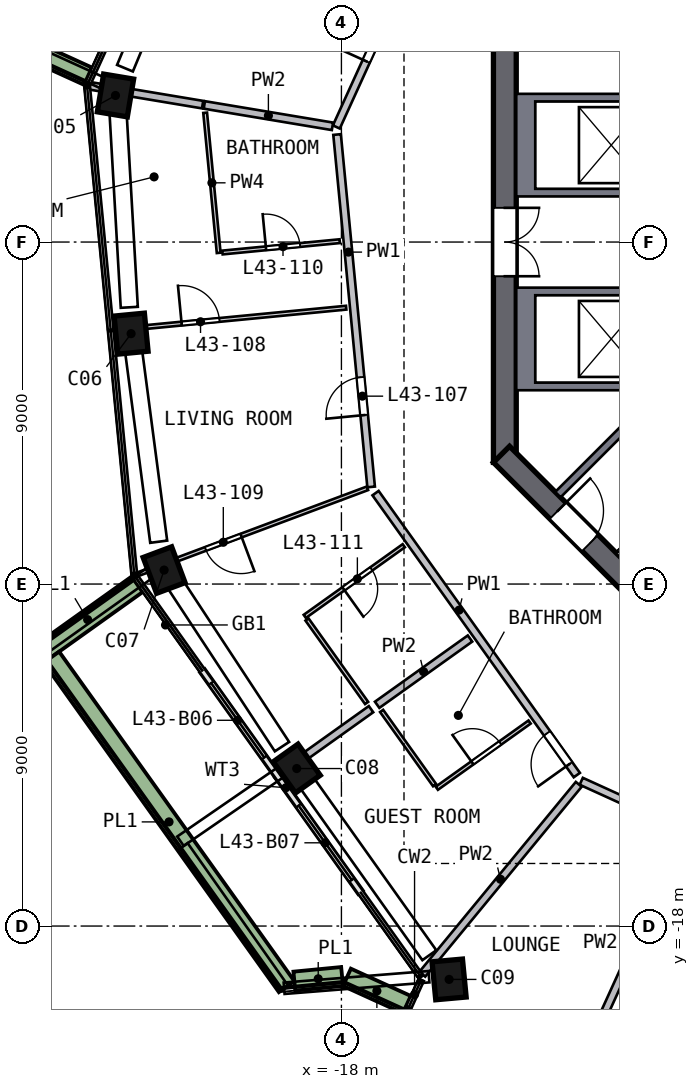
"""IFC4 building model, lengths in metres.
Left out: names, types, materials, properties, quantities, classifications, styles, units other than length and angle.
Written with IfcOpenShell. Run it as: python <this file> out.ifc"""

import sys

from ifc_helpers import new_model, si_unit, direction, frame, frame_2d, origin, origin_2d, place, context, subcontext, project, spatial, polyline, rectangle, outline, extrude, element, fill, save


model = new_model("IFC4")
c1 = context("Model", 3, precision=1e-05, world=origin(), true_north=direction((0.0, 1.0)))
c2 = subcontext(c1, "Body", "Model", "MODEL_VIEW")
j1 = project(units=[si_unit("LENGTHUNIT", "METRE"), si_unit("PLANEANGLEUNIT", "RADIAN")], contexts=[c1])
p1 = place(None, origin())
s1 = spatial("IfcSite", under=j1, at=p1, CompositionType="ELEMENT")
p2 = place(p1, origin())
s2 = spatial("IfcBuilding", under=s1, at=p2, CompositionType="ELEMENT")
p3 = place(p2, frame((0.0, 0.0, 180.0)))
s3 = spatial("IfcBuildingStorey", under=s2, at=p3, CompositionType="ELEMENT", Elevation=180.0)
p4 = place(p3, frame((-23.924, 3.995, 0.0), z_axis=(-0.018017551, -0.113959111, 0.993322047), x_axis=(0.163447069, 0.979782982, 0.115370553)))
e1 = element("IfcColumn", 1, at=p4, inside=s3, PredefinedType="COLUMN", context=c2, shape_type="SweptSolid", body=[
    extrude(rectangle(XDim=1.0, YDim=0.8, at=origin_2d()), origin(), (0.0, 0.0, 1.0), 3.211),
])
p5 = place(p3, frame((-23.549, -2.276, 0.0), z_axis=(0.011711521, -0.111867836, 0.993654078), x_axis=(0.095071466, -0.989095922, -0.112475211)))
e2 = element("IfcColumn", 2, at=p5, inside=s3, PredefinedType="COLUMN", context=c2, shape_type="SweptSolid", body=[
    extrude(rectangle(XDim=1.0, YDim=0.8, at=origin_2d()), origin(), (0.0, 0.0, 1.0), 3.21),
])
p6 = place(p3, frame((-22.716, -8.502, 0.0), z_axis=(0.041357002, -0.107649845, 0.993328299), x_axis=(-0.348347978, 0.93024499, 0.115316716)))
e3 = element("IfcColumn", 3, at=p6, inside=s3, PredefinedType="COLUMN", context=c2, shape_type="SweptSolid", body=[
    extrude(rectangle(XDim=1.0, YDim=0.8, at=origin_2d()), origin(), (0.0, 0.0, 1.0), 3.211),
])
p7 = place(p3, frame((-19.256, -13.745, 0.0), z_axis=(0.066161617, -0.091105306, 0.993641013), x_axis=(0.577029592, -0.808925346, -0.112590564)))
e4 = element("IfcColumn", 4, at=p7, inside=s3, PredefinedType="COLUMN", context=c2, shape_type="SweptSolid", body=[
    extrude(rectangle(XDim=1.0, YDim=0.8, at=origin_2d()), origin(), (0.0, 0.0, 1.0), 3.21),
])
p8 = place(p3, frame((-15.278, -19.318, 0.0), z_axis=(0.092426186, -0.071827916, 0.993125446), x_axis=(-0.089190474, 0.992788189, 0.080104122)))
e5 = element("IfcColumn", 5, at=p8, inside=s3, PredefinedType="COLUMN", context=c2, shape_type="SweptSolid", body=[
    extrude(rectangle(XDim=1.0, YDim=0.8, at=origin_2d()), origin(), (0.0, 0.0, 1.0), 3.212),
])
p9 = place(p3, frame((-13.7, 5.799, 0.0), z_axis=(0.0, 0.0, 1.0), x_axis=(0.0, -1.0, 0.0)))
e6 = element("IfcWall", 6, at=p9, inside=s3, PredefinedType="SHEAR", context=c2, shape_type="SweptSolid", body=[
    extrude(rectangle(XDim=11.598, YDim=0.6, at=frame_2d((5.799, 0.0))), origin(), (0.0, 0.0, 1.0), 3.5),
])
p10 = place(p9, frame((4.899, 0.0, 0.0)))
e7 = element("IfcOpeningElement", 7, at=p10, cuts=e6, PredefinedType="OPENING", context=c2, shape_type="SweptSolid", body=[
    extrude(rectangle(XDim=1.8, YDim=2.1, at=frame_2d((0.9, 1.05))), frame((0.0, 0.31, 0.0), z_axis=(0.0, -1.0, 0.0), x_axis=(1.0, 0.0, 0.0)), (0.0, 0.0, 1.0), 0.62),
])
p11 = place(p3, frame((-13.788, -5.587, 0.0), z_axis=(0.0, 0.0, 1.0), x_axis=(0.707106781, -0.707106781, 0.0)))
e8 = element("IfcWall", 8, at=p11, inside=s3, PredefinedType="SHEAR", context=c2, shape_type="SweptSolid", body=[
    extrude(rectangle(XDim=11.598, YDim=0.6, at=frame_2d((5.799, 0.0))), origin(), (0.0, 0.0, 1.0), 3.5),
])
p12 = place(p11, frame((2.099, 0.0, 0.0)))
e9 = element("IfcOpeningElement", 9, at=p12, cuts=e8, PredefinedType="OPENING", context=c2, shape_type="SweptSolid", body=[
    extrude(rectangle(XDim=1.2, YDim=2.1, at=frame_2d((0.6, 1.05))), frame((0.0, 0.31, 0.0), z_axis=(0.0, -1.0, 0.0), x_axis=(1.0, 0.0, 0.0)), (0.0, 0.0, 1.0), 0.62),
])
p13 = place(p3, frame((-16.351, -20.226, 0.0), z_axis=(0.0, 0.0, 1.0), x_axis=(0.910134462, -0.414312998, 0.0)))
e10 = element("IfcWall", 10, at=p13, inside=s3, PredefinedType="SOLIDWALL", context=c2, shape_type="SweptSolid", body=[
    extrude(rectangle(XDim=1.875, YDim=0.15, at=frame_2d((0.938, 0.0))), origin(), (0.0, 0.0, 1.0), 3.19),
])
p14 = place(p3, frame((-21.658, -11.283, 0.0), z_axis=(0.0, 0.0, 1.0), x_axis=(0.580980052, -0.813917796, 0.0)))
e11 = element("IfcWall", 11, at=p14, inside=s3, PredefinedType="SOLIDWALL", context=c2, shape_type="SweptSolid", body=[
    extrude(rectangle(XDim=3.4, YDim=0.15, at=frame_2d((1.7, 0.0))), origin(), (0.0, 0.0, 1.0), 2.475),
])
p15 = place(p14, frame((0.4, 0.0, 0.0)))
e12 = element("IfcOpeningElement", 12, at=p15, cuts=e11, PredefinedType="OPENING", context=c2, shape_type="SweptSolid", body=[
    extrude(rectangle(XDim=2.4, YDim=2.4, at=frame_2d((1.2, 1.2))), frame((0.0, 0.085, 0.0), z_axis=(0.0, -1.0, 0.0), x_axis=(1.0, 0.0, 0.0)), (0.0, 0.0, 1.0), 0.17),
])
p16 = place(p3, frame((-19.683, -14.05, 0.0), z_axis=(0.0, 0.0, 1.0), x_axis=(0.581004847, -0.813900097, 0.0)))
e13 = element("IfcWall", 13, at=p16, inside=s3, PredefinedType="SOLIDWALL", context=c2, shape_type="SweptSolid", body=[
    extrude(rectangle(XDim=3.761, YDim=0.15, at=frame_2d((1.881, 0.0))), origin(), (0.0, 0.0, 1.0), 2.475),
])
p17 = place(p16, frame((0.961, 0.0, 0.0)))
e14 = element("IfcOpeningElement", 14, at=p17, cuts=e13, PredefinedType="OPENING", context=c2, shape_type="SweptSolid", body=[
    extrude(rectangle(XDim=2.4, YDim=2.4, at=frame_2d((1.2, 1.2))), frame((0.0, 0.085, 0.0), z_axis=(0.0, -1.0, 0.0), x_axis=(1.0, 0.0, 0.0)), (0.0, 0.0, 1.0), 0.17),
])
p18 = place(p3, frame((-27.125, 5.483, 0.0), z_axis=(0.0, 0.0, 1.0), x_axis=(0.910099871, -0.414388978, 0.0)))
e15 = element("IfcWall", 15, at=p18, inside=s3, PredefinedType="SOLIDWALL", context=c2, shape_type="SweptSolid", body=[
    extrude(rectangle(XDim=2.699, YDim=0.5, at=frame_2d((1.35, 0.0))), origin(), (0.0, 0.0, 1.0), 0.7),
])
p19 = place(p3, frame((-23.376, -9.007, 0.0), z_axis=(0.0, 0.0, 1.0), x_axis=(-0.813882991, -0.581028808, 0.0)))
e16 = element("IfcWall", 16, at=p19, inside=s3, PredefinedType="SOLIDWALL", context=c2, shape_type="SweptSolid", body=[
    extrude(rectangle(XDim=3.199, YDim=0.5, at=frame_2d((1.6, 0.0))), origin(), (0.0, 0.0, 1.0), 0.7),
])
p20 = place(p3, frame((-25.631, -10.924, 0.0), z_axis=(0.0, 0.0, 1.0), x_axis=(0.580988848, -0.813911517, 0.0)))
e17 = element("IfcWall", 17, at=p20, inside=s3, PredefinedType="SOLIDWALL", context=c2, shape_type="SweptSolid", body=[
    extrude(rectangle(XDim=10.653, YDim=0.5, at=frame_2d((5.326, 0.0))), origin(), (0.0, 0.0, 1.0), 0.7),
])
p21 = place(p3, frame((-19.239, -19.449, 0.0), z_axis=(0.0, 0.0, 1.0), x_axis=(0.995350014, 0.096324195, 0.0)))
e18 = element("IfcWall", 18, at=p21, inside=s3, PredefinedType="SOLIDWALL", context=c2, shape_type="SweptSolid", body=[
    extrude(rectangle(XDim=1.262, YDim=0.5, at=frame_2d((0.631, 0.0))), origin(), (0.0, 0.0, 1.0), 0.7),
])
p22 = place(p3, frame((-17.855, -19.349, 0.0), z_axis=(0.0, 0.0, 1.0), x_axis=(0.910110312, -0.414366046, 0.0)))
e19 = element("IfcWall", 19, at=p22, inside=s3, PredefinedType="SOLIDWALL", context=c2, shape_type="SweptSolid", body=[
    extrude(rectangle(XDim=1.731, YDim=0.5, at=frame_2d((0.865, 0.0))), origin(), (0.0, 0.0, 1.0), 0.7),
])
p23 = place(p3, origin())
e20 = element("IfcWall", 20, at=p23, inside=s3, PredefinedType="SOLIDWALL", context=c2, shape_type="SweptSolid", body=[
    extrude(outline(polyline([(-13.4, 3.9), (-9.9, 3.9), (-9.9, 3.7), (-12.9, 3.7), (-12.9, 1.4), (-9.9, 1.4), (-9.9, 1.2), (-13.4, 1.2), (-13.4, 3.9)])), origin(), (0.0, 0.0, 1.0), 3.19),
])
p24 = place(p3, origin())
e21 = element("IfcWall", 21, at=p24, inside=s3, PredefinedType="SOLIDWALL", context=c2, shape_type="SweptSolid", body=[
    extrude(outline(polyline([(-13.4, -3.9), (-13.4, -1.2), (-9.9, -1.2), (-9.9, -1.4), (-12.9, -1.4), (-12.9, -3.7), (-9.9, -3.7), (-9.9, -3.9), (-13.4, -3.9)])), origin(), (0.0, 0.0, 1.0), 3.19),
])
p25 = place(p3, frame((-9.334, -3.677, 0.0), z_axis=(0.0, 0.0, 1.0), x_axis=(-0.707135845, -0.707077716, 0.0)))
e22 = element("IfcWall", 22, at=p25, inside=s3, PredefinedType="SOLIDWALL", context=c2, shape_type="SweptSolid", body=[
    extrude(rectangle(XDim=4.2, YDim=0.2, at=frame_2d((2.1, 0.0))), origin(), (0.0, 0.0, 1.0), 3.19),
])
p26 = place(p3, frame((-17.218, -6.445, 0.0), z_axis=(0.0, 0.0, 1.0), x_axis=(-0.096195227, 0.995362486, 0.0)))
e23 = element("IfcWall", 23, at=p26, inside=s3, PredefinedType="SOLIDWALL", context=c2, shape_type="SweptSolid", body=[
    extrude(rectangle(XDim=9.317, YDim=0.2, at=frame_2d((4.658, 0.0))), origin(), (0.0, 0.0, 1.0), 3.19),
])
p27 = place(p26, frame((1.9, 0.0, 0.0)))
e24 = element("IfcOpeningElement", 24, at=p27, cuts=e23, PredefinedType="OPENING", context=c2, shape_type="SweptSolid", body=[
    extrude(rectangle(XDim=1.0, YDim=2.1, at=frame_2d((0.5, 1.05))), frame((0.0, 0.11, 0.0), z_axis=(0.0, -1.0, 0.0), x_axis=(1.0, 0.0, 0.0)), (0.0, 0.0, 1.0), 0.22),
])
p28 = place(p3, frame((-18.134, 3.028, 0.0), z_axis=(0.0, 0.0, 1.0), x_axis=(0.414381347, 0.910103345, 0.0)))
e25 = element("IfcWall", 25, at=p28, inside=s3, PredefinedType="SOLIDWALL", context=c2, shape_type="SweptSolid", body=[
    extrude(rectangle(XDim=9.317, YDim=0.2, at=frame_2d((4.658, 0.0))), origin(), (0.0, 0.0, 1.0), 3.19),
])
p29 = place(p28, frame((1.9, 0.0, 0.0)))
e26 = element("IfcOpeningElement", 26, at=p29, cuts=e25, PredefinedType="OPENING", context=c2, shape_type="SweptSolid", body=[
    extrude(rectangle(XDim=1.0, YDim=2.1, at=frame_2d((0.5, 1.05))), frame((0.0, 0.11, 0.0), z_axis=(0.0, -1.0, 0.0), x_axis=(1.0, 0.0, 0.0)), (0.0, 0.0, 1.0), 0.22),
])
p30 = place(p3, frame((-11.805, -14.027, 0.0), z_axis=(0.0, 0.0, 1.0), x_axis=(-0.580997508, 0.813905336, 0.0)))
e27 = element("IfcWall", 27, at=p30, inside=s3, PredefinedType="SOLIDWALL", context=c2, shape_type="SweptSolid", body=[
    extrude(rectangle(XDim=9.116, YDim=0.2, at=frame_2d((4.558, 0.0))), origin(), (0.0, 0.0, 1.0), 3.19),
])
p31 = place(p30, frame((0.35, 0.0, 0.0)))
e28 = element("IfcOpeningElement", 28, at=p31, cuts=e27, PredefinedType="OPENING", context=c2, shape_type="SweptSolid", body=[
    extrude(rectangle(XDim=1.0, YDim=2.1, at=frame_2d((0.5, 1.05))), frame((0.0, 0.11, 0.0), z_axis=(0.0, -1.0, 0.0), x_axis=(1.0, 0.0, 0.0)), (0.0, 0.0, 1.0), 0.22),
])
p32 = place(p3, frame((-3.028, -18.134, 0.0), z_axis=(0.0, 0.0, 1.0), x_axis=(-0.910100085, 0.414388507, 0.0)))
e29 = element("IfcWall", 29, at=p32, inside=s3, PredefinedType="SOLIDWALL", context=c2, shape_type="SweptSolid", body=[
    extrude(rectangle(XDim=9.517, YDim=0.2, at=frame_2d((4.758, 0.0))), origin(), (0.0, 0.0, 1.0), 3.19),
])
p33 = place(p32, frame((3.869, 0.0, 0.0)))
e30 = element("IfcOpeningElement", 30, at=p33, cuts=e29, PredefinedType="OPENING", context=c2, shape_type="SweptSolid", body=[
    extrude(rectangle(XDim=1.8, YDim=2.1, at=frame_2d((0.9, 1.05))), frame((0.0, 0.11, 0.0), z_axis=(0.0, -1.0, 0.0), x_axis=(1.0, 0.0, 0.0)), (0.0, 0.0, 1.0), 0.22),
])
p34 = place(p3, frame((-21.653, 3.616, 0.0), z_axis=(0.0, 0.0, 1.0), x_axis=(-0.986336894, 0.1647408, 0.0)))
e31 = element("IfcWall", 31, at=p34, inside=s3, PredefinedType="SOLIDWALL", context=c2, shape_type="SweptSolid", body=[
    extrude(rectangle(XDim=3.011, YDim=0.2, at=frame_2d((1.506, 0.0))), origin(), (0.0, 0.0, 1.0), 3.19),
])
p35 = place(p3, frame((-18.236, 3.045, 0.0), z_axis=(0.0, 0.0, 1.0), x_axis=(-0.986343689, 0.164700112, 0.0)))
e32 = element("IfcWall", 32, at=p35, inside=s3, PredefinedType="SOLIDWALL", context=c2, shape_type="SweptSolid", body=[
    extrude(rectangle(XDim=3.418, YDim=0.2, at=frame_2d((1.709, 0.0))), origin(), (0.0, 0.0, 1.0), 3.19),
])
p36 = place(p3, frame((-17.221, -12.293, 0.0), z_axis=(0.0, 0.0, 1.0), x_axis=(-0.813929138, -0.580964163, 0.0)))
e33 = element("IfcWall", 33, at=p36, inside=s3, PredefinedType="SOLIDWALL", context=c2, shape_type="SweptSolid", body=[
    extrude(rectangle(XDim=2.95, YDim=0.2, at=frame_2d((1.475, 0.0))), origin(), (0.0, 0.0, 1.0), 3.19),
])
p37 = place(p3, frame((-14.616, -10.434, 0.0), z_axis=(0.0, 0.0, 1.0), x_axis=(-0.813909274, -0.580991992, 0.0)))
e34 = element("IfcWall", 34, at=p37, inside=s3, PredefinedType="SOLIDWALL", context=c2, shape_type="SweptSolid", body=[
    extrude(rectangle(XDim=3.002, YDim=0.2, at=frame_2d((1.501, 0.0))), origin(), (0.0, 0.0, 1.0), 3.19),
])
p38 = place(p3, frame((-15.872, -19.268, 0.0), z_axis=(0.0, 0.0, 1.0), x_axis=(0.635816927, 0.771839902, 0.0)))
e35 = element("IfcWall", 35, at=p38, inside=s3, PredefinedType="SOLIDWALL", context=c2, shape_type="SweptSolid", body=[
    extrude(rectangle(XDim=6.476, YDim=0.2, at=frame_2d((3.238, 0.0))), origin(), (0.0, 0.0, 1.0), 3.19),
])
p39 = place(p3, frame((-13.421, -25.433, 0.0), z_axis=(0.0, 0.0, 1.0), x_axis=(0.414377782, 0.910104968, 0.0)))
e36 = element("IfcWall", 36, at=p39, inside=s3, PredefinedType="SOLIDWALL", context=c2, shape_type="SweptSolid", body=[
    extrude(rectangle(XDim=10.75, YDim=0.2, at=frame_2d((5.375, 0.0))), origin(), (0.0, 0.0, 1.0), 3.19),
])
p40 = place(p39, frame((1.95, 0.0, 0.0)))
e37 = element("IfcOpeningElement", 37, at=p40, cuts=e36, PredefinedType="OPENING", context=c2, shape_type="SweptSolid", body=[
    extrude(rectangle(XDim=1.0, YDim=2.1, at=frame_2d((0.5, 1.05))), frame((0.0, 0.11, 0.0), z_axis=(0.0, -1.0, 0.0), x_axis=(1.0, 0.0, 0.0)), (0.0, 0.0, 1.0), 0.22),
])
p41 = place(p3, frame((-21.586, 3.402, 0.0), z_axis=(0.0, 0.0, 1.0), x_axis=(0.096168311, -0.995365087, 0.0)))
e38 = element("IfcWall", 38, at=p41, inside=s3, PredefinedType="PARTITIONING", context=c2, shape_type="SweptSolid", body=[
    extrude(rectangle(XDim=3.704, YDim=0.1, at=frame_2d((1.852, 0.0))), origin(), (0.0, 0.0, 1.0), 3.19),
])
p42 = place(p3, frame((-23.997, -2.319, 0.0), z_axis=(0.0, 0.0, 1.0), x_axis=(0.995363386, 0.096185909, 0.0)))
e39 = element("IfcWall", 39, at=p42, inside=s3, PredefinedType="PARTITIONING", context=c2, shape_type="SweptSolid", body=[
    extrude(rectangle(XDim=6.15, YDim=0.1, at=frame_2d((3.075, 0.0))), origin(), (0.0, 0.0, 1.0), 3.19),
])
p43 = place(p42, frame((1.8, 0.0, 0.0)))
e40 = element("IfcOpeningElement", 40, at=p43, cuts=e39, PredefinedType="OPENING", context=c2, shape_type="SweptSolid", body=[
    extrude(rectangle(XDim=1.0, YDim=2.1, at=frame_2d((0.5, 1.05))), frame((0.0, 0.06, 0.0), z_axis=(0.0, -1.0, 0.0), x_axis=(1.0, 0.0, 0.0)), (0.0, 0.0, 1.0), 0.12),
])
p44 = place(p3, frame((-17.315, -6.481, 0.0), z_axis=(0.0, 0.0, 1.0), x_axis=(-0.936548998, -0.350536695, 0.0)))
e41 = element("IfcWall", 41, at=p44, inside=s3, PredefinedType="PARTITIONING", context=c2, shape_type="SweptSolid", body=[
    extrude(rectangle(XDim=6.476, YDim=0.1, at=frame_2d((3.238, 0.0))), origin(), (0.0, 0.0, 1.0), 3.19),
])
p45 = place(p44, frame((3.55, 0.0, 0.0)))
e42 = element("IfcOpeningElement", 42, at=p45, cuts=e41, PredefinedType="OPENING", context=c2, shape_type="SweptSolid", body=[
    extrude(rectangle(XDim=1.0, YDim=2.1, at=frame_2d((0.5, 1.05))), frame((0.0, 0.06, 0.0), z_axis=(0.0, -1.0, 0.0), x_axis=(1.0, 0.0, 0.0)), (0.0, 0.0, 1.0), 0.12),
])
p46 = place(p3, frame((-21.13, -0.275, 0.0), z_axis=(0.0, 0.0, 1.0), x_axis=(0.995366075, 0.09615808, 0.0)))
e43 = element("IfcWall", 43, at=p46, inside=s3, PredefinedType="PARTITIONING", context=c2, shape_type="SweptSolid", body=[
    extrude(rectangle(XDim=3.1, YDim=0.1, at=frame_2d((1.55, 0.0))), origin(), (0.0, 0.0, 1.0), 3.19),
])
p47 = place(p46, frame((1.15, 0.0, 0.0)))
e44 = element("IfcOpeningElement", 44, at=p47, cuts=e43, PredefinedType="OPENING", context=c2, shape_type="SweptSolid", body=[
    extrude(rectangle(XDim=0.9, YDim=2.1, at=frame_2d((0.45, 1.05))), frame((0.0, 0.06, 0.0), z_axis=(0.0, -1.0, 0.0), x_axis=(1.0, 0.0, 0.0)), (0.0, 0.0, 1.0), 0.12),
])
p48 = place(p3, frame((-18.906, -9.932, 0.0), z_axis=(0.0, 0.0, 1.0), x_axis=(0.581041451, -0.813873966, 0.0)))
e45 = element("IfcWall", 45, at=p48, inside=s3, PredefinedType="PARTITIONING", context=c2, shape_type="SweptSolid", body=[
    extrude(rectangle(XDim=2.7, YDim=0.1, at=frame_2d((1.35, 0.0))), origin(), (0.0, 0.0, 1.0), 3.19),
])
p49 = place(p3, frame((-16.36, -7.992, 0.0), z_axis=(0.0, 0.0, 1.0), x_axis=(-0.813877781, -0.581036106, 0.0)))
e46 = element("IfcWall", 46, at=p49, inside=s3, PredefinedType="PARTITIONING", context=c2, shape_type="SweptSolid", body=[
    extrude(rectangle(XDim=3.2, YDim=0.1, at=frame_2d((1.6, 0.0))), origin(), (0.0, 0.0, 1.0), 3.19),
])
p50 = place(p49, frame((1.05, 0.0, 0.0)))
e47 = element("IfcOpeningElement", 47, at=p50, cuts=e46, PredefinedType="OPENING", context=c2, shape_type="SweptSolid", body=[
    extrude(rectangle(XDim=0.9, YDim=2.1, at=frame_2d((0.45, 1.05))), frame((0.0, 0.06, 0.0), z_axis=(0.0, -1.0, 0.0), x_axis=(1.0, 0.0, 0.0)), (0.0, 0.0, 1.0), 0.12),
])
p51 = place(p3, frame((-15.548, -14.293, 0.0), z_axis=(0.0, 0.0, 1.0), x_axis=(-0.581036106, 0.813877781, 0.0)))
e48 = element("IfcWall", 48, at=p51, inside=s3, PredefinedType="PARTITIONING", context=c2, shape_type="SweptSolid", body=[
    extrude(rectangle(XDim=2.4, YDim=0.1, at=frame_2d((1.2, 0.0))), origin(), (0.0, 0.0, 1.0), 3.19),
])
p52 = place(p3, frame((-15.49, -14.374, 0.0), z_axis=(0.0, 0.0, 1.0), x_axis=(0.813909397, 0.580991819, 0.0)))
e49 = element("IfcWall", 49, at=p52, inside=s3, PredefinedType="PARTITIONING", context=c2, shape_type="SweptSolid", body=[
    extrude(rectangle(XDim=3.0, YDim=0.1, at=frame_2d((1.5, 0.0))), origin(), (0.0, 0.0, 1.0), 3.19),
])
p53 = place(p52, frame((1.15, 0.0, 0.0)))
e50 = element("IfcOpeningElement", 50, at=p53, cuts=e49, PredefinedType="OPENING", context=c2, shape_type="SweptSolid", body=[
    extrude(rectangle(XDim=0.9, YDim=2.1, at=frame_2d((0.45, 1.05))), frame((0.0, 0.06, 0.0), z_axis=(0.0, -1.0, 0.0), x_axis=(1.0, 0.0, 0.0)), (0.0, 0.0, 1.0), 0.12),
])
p54 = place(p15, origin())
e51 = element("IfcDoor", 51, at=p54, inside=s3, OperationType="SLIDING_TO_RIGHT", PredefinedType="DOOR", context=c2, shape_type="SweptSolid", body=[
    extrude(rectangle(XDim=2.4, YDim=2.4, at=frame_2d((1.2, 1.2))), frame((0.0, 0.025, 0.0), z_axis=(0.0, -1.0, 0.0), x_axis=(1.0, 0.0, 0.0)), (0.0, 0.0, 1.0), 0.05),
])
fill(e12, e51)
p55 = place(p17, origin())
e52 = element("IfcDoor", 52, at=p55, inside=s3, OperationType="SLIDING_TO_LEFT", PredefinedType="DOOR", context=c2, shape_type="SweptSolid", body=[
    extrude(rectangle(XDim=2.4, YDim=2.4, at=frame_2d((1.2, 1.2))), frame((0.0, 0.025, 0.0), z_axis=(0.0, -1.0, 0.0), x_axis=(1.0, 0.0, 0.0)), (0.0, 0.0, 1.0), 0.05),
])
fill(e14, e52)
p56 = place(p10, origin())
e53 = element("IfcDoor", 53, at=p56, inside=s3, OperationType="DOUBLE_DOOR_SINGLE_SWING", PredefinedType="DOOR", context=c2, shape_type="SweptSolid", body=[
    extrude(rectangle(XDim=1.8, YDim=2.1, at=frame_2d((0.9, 1.05))), frame((0.0, 0.025, 0.0), z_axis=(0.0, -1.0, 0.0), x_axis=(1.0, 0.0, 0.0)), (0.0, 0.0, 1.0), 0.05),
])
fill(e7, e53)
p57 = place(p12, origin())
e54 = element("IfcDoor", 54, at=p57, inside=s3, OperationType="SINGLE_SWING_LEFT", PredefinedType="DOOR", context=c2, shape_type="SweptSolid", body=[
    extrude(rectangle(XDim=1.2, YDim=2.1, at=frame_2d((0.6, 1.05))), frame((0.0, 0.025, 0.0), z_axis=(0.0, -1.0, 0.0), x_axis=(1.0, 0.0, 0.0)), (0.0, 0.0, 1.0), 0.05),
])
fill(e9, e54)
p58 = place(p29, origin())
e55 = element("IfcDoor", 55, at=p58, inside=s3, OperationType="SINGLE_SWING_LEFT", PredefinedType="DOOR", context=c2, shape_type="SweptSolid", body=[
    extrude(rectangle(XDim=1.0, YDim=2.1, at=frame_2d((0.5, 1.05))), frame((0.0, 0.025, 0.0), z_axis=(0.0, -1.0, 0.0), x_axis=(1.0, 0.0, 0.0)), (0.0, 0.0, 1.0), 0.05),
])
fill(e26, e55)
p59 = place(p27, origin())
e56 = element("IfcDoor", 56, at=p59, inside=s3, OperationType="SINGLE_SWING_LEFT", PredefinedType="DOOR", context=c2, shape_type="SweptSolid", body=[
    extrude(rectangle(XDim=1.0, YDim=2.1, at=frame_2d((0.5, 1.05))), frame((0.0, 0.025, 0.0), z_axis=(0.0, -1.0, 0.0), x_axis=(1.0, 0.0, 0.0)), (0.0, 0.0, 1.0), 0.05),
])
fill(e24, e56)
p60 = place(p43, origin())
e57 = element("IfcDoor", 57, at=p60, inside=s3, OperationType="SINGLE_SWING_LEFT", PredefinedType="DOOR", context=c2, shape_type="SweptSolid", body=[
    extrude(rectangle(XDim=1.0, YDim=2.1, at=frame_2d((0.5, 1.05))), frame((0.0, 0.025, 0.0), z_axis=(0.0, -1.0, 0.0), x_axis=(1.0, 0.0, 0.0)), (0.0, 0.0, 1.0), 0.05),
])
fill(e40, e57)
p61 = place(p45, origin())
e58 = element("IfcDoor", 58, at=p61, inside=s3, OperationType="SINGLE_SWING_LEFT", PredefinedType="DOOR", context=c2, shape_type="SweptSolid", body=[
    extrude(rectangle(XDim=1.0, YDim=2.1, at=frame_2d((0.5, 1.05))), frame((0.0, 0.025, 0.0), z_axis=(0.0, -1.0, 0.0), x_axis=(1.0, 0.0, 0.0)), (0.0, 0.0, 1.0), 0.05),
])
fill(e42, e58)
p62 = place(p47, origin())
e59 = element("IfcDoor", 59, at=p62, inside=s3, OperationType="SINGLE_SWING_LEFT", PredefinedType="DOOR", context=c2, shape_type="SweptSolid", body=[
    extrude(rectangle(XDim=0.9, YDim=2.1, at=frame_2d((0.45, 1.05))), frame((0.0, 0.025, 0.0), z_axis=(0.0, -1.0, 0.0), x_axis=(1.0, 0.0, 0.0)), (0.0, 0.0, 1.0), 0.05),
])
fill(e44, e59)
p63 = place(p50, origin())
e60 = element("IfcDoor", 60, at=p63, inside=s3, OperationType="SINGLE_SWING_RIGHT", PredefinedType="DOOR", context=c2, shape_type="SweptSolid", body=[
    extrude(rectangle(XDim=0.9, YDim=2.1, at=frame_2d((0.45, 1.05))), frame((0.0, 0.025, 0.0), z_axis=(0.0, -1.0, 0.0), x_axis=(1.0, 0.0, 0.0)), (0.0, 0.0, 1.0), 0.05),
])
fill(e47, e60)
p64 = place(p31, origin())
e61 = element("IfcDoor", 61, at=p64, inside=s3, OperationType="SINGLE_SWING_LEFT", PredefinedType="DOOR", context=c2, shape_type="SweptSolid", body=[
    extrude(rectangle(XDim=1.0, YDim=2.1, at=frame_2d((0.5, 1.05))), frame((0.0, 0.025, 0.0), z_axis=(0.0, -1.0, 0.0), x_axis=(1.0, 0.0, 0.0)), (0.0, 0.0, 1.0), 0.05),
])
fill(e28, e61)
p65 = place(p53, origin())
e62 = element("IfcDoor", 62, at=p65, inside=s3, OperationType="SINGLE_SWING_LEFT", PredefinedType="DOOR", context=c2, shape_type="SweptSolid", body=[
    extrude(rectangle(XDim=0.9, YDim=2.1, at=frame_2d((0.45, 1.05))), frame((0.0, 0.025, 0.0), z_axis=(0.0, -1.0, 0.0), x_axis=(1.0, 0.0, 0.0)), (0.0, 0.0, 1.0), 0.05),
])
fill(e50, e62)
save(model, sys.argv[1])
